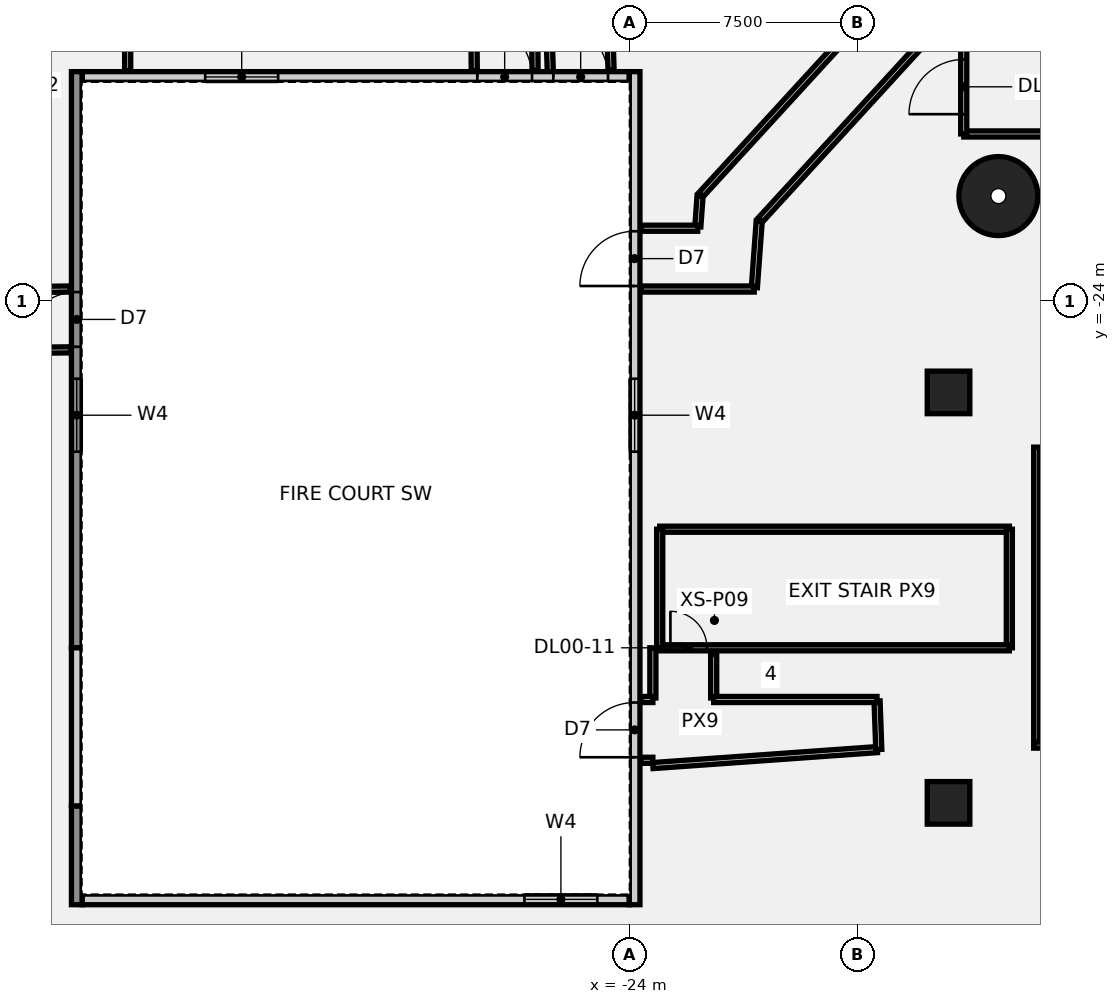
"""IFC4 building model, lengths in metres.
Left out: names, types, materials, properties, quantities, classifications, styles, units other than length and angle.
Written with IfcOpenShell. Run it as: python <this file> out.ifc"""

import sys

from ifc_helpers import new_model, si_unit, direction, frame, frame_2d, origin, origin_2d, place, context, subcontext, project, spatial, rectangle, circle, extrude, element, fill, save


model = new_model("IFC4")
c1 = context("Model", 3, precision=1e-05, world=origin(), true_north=direction((0.0, 1.0)))
c2 = subcontext(c1, "Body", "Model", "MODEL_VIEW")
j1 = project(units=[si_unit("LENGTHUNIT", "METRE"), si_unit("PLANEANGLEUNIT", "RADIAN")], contexts=[c1])
p1 = place(None, origin())
s1 = spatial("IfcSite", under=j1, at=p1, CompositionType="ELEMENT")
p2 = place(p1, origin())
s2 = spatial("IfcBuilding", under=s1, at=p2, CompositionType="ELEMENT")
p3 = place(p2, origin())
s3 = spatial("IfcBuildingStorey", under=s2, at=p3, CompositionType="ELEMENT", Elevation=0.0)
p4 = place(p3, frame((-11.86, -20.543, -0.55), z_axis=(0.0, 0.0, 1.0), x_axis=(1.0, 0.0, 0.0)))
e1 = element("IfcColumn", 1, at=p4, inside=s3, PredefinedType="COLUMN", context=c2, shape_type="SweptSolid", body=[
    extrude(circle(Radius=1.3, at=origin_2d()), origin(), (0.0, 0.0, 1.0), 9.05),
])
for number, where, z_axis, x_axis in (
    (2, (-13.5, -40.5, -0.55), (0.0, 0.0, 1.0), (1.0, 0.0, 0.0)),
    (3, (-13.5, -27.0, -0.55), (0.0, 0.0, 1.0), (1.0, 0.0, 0.0)),
):
    element("IfcColumn", number, at=place(p3, frame(where, z_axis=z_axis, x_axis=x_axis)), inside=s3, PredefinedType="COLUMN", context=c2, shape_type="SweptSolid", body=[
        extrude(rectangle(XDim=1.4, YDim=1.4, at=origin_2d()), origin(), (0.0, 0.0, 1.0), 9.05),
    ])
p5 = place(p3, frame((-23.0, -31.5, 0.0), z_axis=(0.0, 0.0, 1.0), x_axis=(1.0, 0.0, 0.0)))
e4 = element("IfcWall", 4, at=p5, inside=s3, PredefinedType="PARTITIONING", context=c2, shape_type="SweptSolid", body=[
    extrude(rectangle(XDim=11.5, YDim=0.2, at=frame_2d((5.75, 0.0))), origin(), (0.0, 0.0, 1.0), 8.5),
])
p6 = place(p3, frame((-11.5, -35.4, 0.0), z_axis=(0.0, 0.0, 1.0), x_axis=(0.0, 1.0, 0.0)))
e5 = element("IfcWall", 5, at=p6, inside=s3, PredefinedType="PARTITIONING", context=c2, shape_type="SweptSolid", body=[
    extrude(rectangle(XDim=3.9, YDim=0.2, at=frame_2d((1.95, 0.0))), origin(), (0.0, 0.0, 1.0), 8.5),
])
p7 = place(p3, frame((-23.0, -35.4, 0.0), z_axis=(0.0, 0.0, 1.0), x_axis=(1.0, 0.0, 0.0)))
e6 = element("IfcWall", 6, at=p7, inside=s3, PredefinedType="PARTITIONING", context=c2, shape_type="SweptSolid", body=[
    extrude(rectangle(XDim=11.5, YDim=0.2, at=frame_2d((5.75, 0.0))), origin(), (0.0, 0.0, 1.0), 8.5),
])
p8 = place(p7, frame((0.352, 0.0, 0.0)))
e7 = element("IfcOpeningElement", 7, at=p8, cuts=e6, PredefinedType="OPENING", context=c2, shape_type="SweptSolid", body=[
    extrude(rectangle(XDim=1.2, YDim=2.1, at=frame_2d((0.6, 1.05))), frame((0.0, 0.11, 0.0), z_axis=(0.0, -1.0, 0.0), x_axis=(1.0, 0.0, 0.0)), (0.0, 0.0, 1.0), 0.22),
])
p9 = place(p3, frame((-23.0, -35.4, 0.0), z_axis=(0.0, 0.0, 1.0), x_axis=(0.0, 1.0, 0.0)))
e8 = element("IfcWall", 8, at=p9, inside=s3, PredefinedType="PARTITIONING", context=c2, shape_type="SweptSolid", body=[
    extrude(rectangle(XDim=3.9, YDim=0.2, at=frame_2d((1.95, 0.0))), origin(), (0.0, 0.0, 1.0), 8.5),
])
p10 = place(p3, frame((-40.5, -16.42, 0.0), z_axis=(0.0, 0.0, 1.0), x_axis=(0.0, 1.0, 0.0)))
e9 = element("IfcWall", 9, at=p10, inside=s3, PredefinedType="PARTITIONING", context=c2, shape_type="SweptSolid", body=[
    extrude(rectangle(XDim=2.92, YDim=0.2, at=frame_2d((1.46, 0.0))), origin(), (0.0, 0.0, 1.0), 8.5),
])
p11 = place(p3, frame((-13.0, -18.5, 0.0), z_axis=(0.0, 0.0, 1.0), x_axis=(1.0, 0.0, 0.0)))
e10 = element("IfcWall", 10, at=p11, inside=s3, PredefinedType="PARTITIONING", context=c2, shape_type="SweptSolid", body=[
    extrude(rectangle(XDim=5.5, YDim=0.2, at=frame_2d((2.75, 0.0))), origin(), (0.0, 0.0, 1.0), 8.5),
])
p12 = place(p3, frame((-13.0, -18.5, 0.0), z_axis=(0.0, 0.0, 1.0), x_axis=(0.0, 1.0, 0.0)))
e11 = element("IfcWall", 11, at=p12, inside=s3, PredefinedType="PARTITIONING", context=c2, shape_type="SweptSolid", body=[
    extrude(rectangle(XDim=4.292, YDim=0.2, at=frame_2d((2.146, 0.0))), origin(), (0.0, 0.0, 1.0), 8.5),
])
p13 = place(p12, frame((0.651, 0.0, 0.0)))
e12 = element("IfcOpeningElement", 12, at=p13, cuts=e11, PredefinedType="OPENING", context=c2, shape_type="SweptSolid", body=[
    extrude(rectangle(XDim=1.8, YDim=2.1, at=frame_2d((0.9, 1.05))), frame((0.0, 0.11, 0.0), z_axis=(0.0, -1.0, 0.0), x_axis=(1.0, 0.0, 0.0)), (0.0, 0.0, 1.0), 0.22),
])
p14 = place(p3, frame((-27.203, -4.085, 0.0), z_axis=(0.0, 0.0, 1.0), x_axis=(0.008338160089, -0.999965236939, 0.0)))
e13 = element("IfcWall", 13, at=p14, inside=s3, PredefinedType="PARTITIONING", context=c2, shape_type="SweptSolid", body=[
    extrude(rectangle(XDim=12.327, YDim=0.2, at=frame_2d((6.164, 0.0))), origin(), (0.0, 0.0, 1.0), 8.5),
])
p15 = place(p3, frame((-29.197, -4.815, 0.0), z_axis=(0.0, 0.0, 1.0), x_axis=(0.008345305348, -0.999965177333, 0.0)))
e14 = element("IfcWall", 14, at=p15, inside=s3, PredefinedType="PARTITIONING", context=c2, shape_type="SweptSolid", body=[
    extrude(rectangle(XDim=11.614, YDim=0.2, at=frame_2d((5.807, 0.0))), origin(), (0.0, 0.0, 1.0), 8.5),
])
p16 = place(p3, frame((-12.01, -12.95, 0.0), z_axis=(0.0, 0.0, 1.0), x_axis=(-0.675727545108, -0.737151466648, 0.0)))
e15 = element("IfcWall", 15, at=p16, inside=s3, PredefinedType="PARTITIONING", context=c2, shape_type="SweptSolid", body=[
    extrude(rectangle(XDim=11.372, YDim=0.2, at=frame_2d((5.686, 0.0))), origin(), (0.0, 0.0, 1.0), 8.5),
])
p17 = place(p3, frame((-19.728, -21.369, 0.0), z_axis=(0.0, 0.0, 1.0), x_axis=(-0.072580125399, -0.997362584719, 0.0)))
e16 = element("IfcWall", 16, at=p17, inside=s3, PredefinedType="PARTITIONING", context=c2, shape_type="SweptSolid", body=[
    extrude(rectangle(XDim=2.187, YDim=0.2, at=frame_2d((1.093, 0.0))), origin(), (0.0, 0.0, 1.0), 8.5),
])
p18 = place(p3, frame((-19.89, -23.6, 0.0), z_axis=(0.0, 0.0, 1.0), x_axis=(-1.0, 0.0, 0.0)))
e17 = element("IfcWall", 17, at=p18, inside=s3, PredefinedType="PARTITIONING", context=c2, shape_type="SweptSolid", body=[
    extrude(rectangle(XDim=3.73, YDim=0.2, at=frame_2d((1.865, 0.0))), origin(), (0.0, 0.0, 1.0), 8.5),
])
p19 = place(p3, frame((-12.89, -10.95, 0.0), z_axis=(0.0, 0.0, 1.0), x_axis=(-0.675720358886, -0.737158054007, 0.0)))
e18 = element("IfcWall", 18, at=p19, inside=s3, PredefinedType="PARTITIONING", context=c2, shape_type="SweptSolid", body=[
    extrude(rectangle(XDim=12.947, YDim=0.2, at=frame_2d((6.473, 0.0))), origin(), (0.0, 0.0, 1.0), 8.5),
])
p20 = place(p3, frame((-21.672, -20.531, 0.0), z_axis=(0.0, 0.0, 1.0), x_axis=(-0.072604808335, -0.997360788184, 0.0)))
e19 = element("IfcWall", 19, at=p20, inside=s3, PredefinedType="PARTITIONING", context=c2, shape_type="SweptSolid", body=[
    extrude(rectangle(XDim=1.022, YDim=0.2, at=frame_2d((0.511, 0.0))), origin(), (0.0, 0.0, 1.0), 8.5),
])
p21 = place(p3, frame((-21.75, -21.6, 0.0), z_axis=(0.0, 0.0, 1.0), x_axis=(-1.0, 0.0, 0.0)))
e20 = element("IfcWall", 20, at=p21, inside=s3, PredefinedType="PARTITIONING", context=c2, shape_type="SweptSolid", body=[
    extrude(rectangle(XDim=1.87, YDim=0.2, at=frame_2d((0.935, 0.0))), origin(), (0.0, 0.0, 1.0), 8.5),
])
p22 = place(p3, frame((-51.762, -23.701, 0.0), z_axis=(0.0, 0.0, 1.0), x_axis=(0.999942399474, 0.010733020753, 0.0)))
e21 = element("IfcWall", 21, at=p22, inside=s3, PredefinedType="PARTITIONING", context=c2, shape_type="SweptSolid", body=[
    extrude(rectangle(XDim=9.372, YDim=0.2, at=frame_2d((4.686, 0.0))), origin(), (0.0, 0.0, 1.0), 8.5),
])
p23 = place(p3, frame((-51.638, -25.699, 0.0), z_axis=(0.0, 0.0, 1.0), x_axis=(0.999942261828, 0.010745836876, 0.0)))
e22 = element("IfcWall", 22, at=p23, inside=s3, PredefinedType="PARTITIONING", context=c2, shape_type="SweptSolid", body=[
    extrude(rectangle(XDim=9.27, YDim=0.2, at=frame_2d((4.635, 0.0))), origin(), (0.0, 0.0, 1.0), 8.5),
])
p24 = place(p3, frame((-21.225, -35.62, 0.0), z_axis=(0.0, 0.0, 1.0), x_axis=(0.0, -1.0, 0.0)))
e23 = element("IfcWall", 23, at=p24, inside=s3, PredefinedType="PARTITIONING", context=c2, shape_type="SweptSolid", body=[
    extrude(rectangle(XDim=1.43, YDim=0.2, at=frame_2d((0.715, 0.0))), origin(), (0.0, 0.0, 1.0), 8.5),
])
p25 = place(p3, frame((-23.225, -39.1, 0.0), z_axis=(0.0, 0.0, 1.0), x_axis=(-1.0, 0.0, 0.0)))
e24 = element("IfcWall", 24, at=p25, inside=s3, PredefinedType="PARTITIONING", context=c2, shape_type="SweptSolid", body=[
    extrude(rectangle(XDim=0.395, YDim=0.2, at=frame_2d((0.198, 0.0))), origin(), (0.0, 0.0, 1.0), 8.5),
])
p26 = place(p3, frame((-23.225, -35.4, 0.0), z_axis=(0.0, 0.0, 1.0), x_axis=(0.0, -1.0, 0.0)))
e25 = element("IfcWall", 25, at=p26, inside=s3, PredefinedType="PARTITIONING", context=c2, shape_type="SweptSolid", body=[
    extrude(rectangle(XDim=1.65, YDim=0.2, at=frame_2d((0.825, 0.0))), origin(), (0.0, 0.0, 1.0), 8.5),
])
p27 = place(p3, frame((-23.225, -37.1, 0.0), z_axis=(0.0, 0.0, 1.0), x_axis=(-1.0, 0.0, 0.0)))
e26 = element("IfcWall", 26, at=p27, inside=s3, PredefinedType="PARTITIONING", context=c2, shape_type="SweptSolid", body=[
    extrude(rectangle(XDim=0.395, YDim=0.2, at=frame_2d((0.198, 0.0))), origin(), (0.0, 0.0, 1.0), 8.5),
])
p28 = place(p3, frame((-23.225, -39.274, 0.0), z_axis=(0.0, 0.0, 1.0), x_axis=(0.997476420844, 0.070998520131, 0.0)))
e27 = element("IfcWall", 27, at=p28, inside=s3, PredefinedType="PARTITIONING", context=c2, shape_type="SweptSolid", body=[
    extrude(rectangle(XDim=7.4, YDim=0.2, at=frame_2d((3.7, 0.0))), origin(), (0.0, 0.0, 1.0), 8.5),
])
p29 = place(p3, frame((-15.794, -38.745, 0.0), z_axis=(0.0, 0.0, 1.0), x_axis=(-0.035489644916, 0.99937004413, 0.0)))
e28 = element("IfcWall", 28, at=p29, inside=s3, PredefinedType="PARTITIONING", context=c2, shape_type="SweptSolid", body=[
    extrude(rectangle(XDim=1.596, YDim=0.2, at=frame_2d((0.798, 0.0))), origin(), (0.0, 0.0, 1.0), 8.5),
])
p30 = place(p3, frame((-15.852, -37.1, 0.0), z_axis=(0.0, 0.0, 1.0), x_axis=(-1.0, 0.0, 0.0)))
e29 = element("IfcWall", 29, at=p30, inside=s3, PredefinedType="PARTITIONING", context=c2, shape_type="SweptSolid", body=[
    extrude(rectangle(XDim=5.373, YDim=0.2, at=frame_2d((2.687, 0.0))), origin(), (0.0, 0.0, 1.0), 8.5),
])
p31 = place(p3, frame((-24.695, -13.355, 0.0), z_axis=(0.0, 0.0, 1.0), x_axis=(0.030966071292, -0.999520436224, 0.0)))
e30 = element("IfcWall", 30, at=p31, inside=s3, PredefinedType="PARTITIONING", context=c2, shape_type="SweptSolid", body=[
    extrude(rectangle(XDim=3.035, YDim=0.2, at=frame_2d((1.518, 0.0))), origin(), (0.0, 0.0, 1.0), 8.5),
])
p32 = place(p3, frame((-26.705, -13.045, 0.0), z_axis=(0.0, 0.0, 1.0), x_axis=(0.031031151855, -0.999518417847, 0.0)))
e31 = element("IfcWall", 31, at=p32, inside=s3, PredefinedType="PARTITIONING", context=c2, shape_type="SweptSolid", body=[
    extrude(rectangle(XDim=3.407, YDim=0.2, at=frame_2d((1.703, 0.0))), origin(), (0.0, 0.0, 1.0), 8.5),
])
p33 = place(p3, frame((-10.6, -28.8, 0.0), z_axis=(0.0, 0.0, 1.0), x_axis=(0.0, -1.0, 0.0)))
e32 = element("IfcWall", 32, at=p33, inside=s3, PredefinedType="SOLIDWALL", context=c2, shape_type="SweptSolid", body=[
    extrude(rectangle(XDim=9.7, YDim=0.2, at=frame_2d((4.85, 0.0))), origin(), (0.0, 0.0, 1.0), 8.5),
])
p34 = place(p3, frame((-10.7, -38.6, 0.0), z_axis=(0.0, 0.0, 1.0), x_axis=(1.0, 0.0, 0.0)))
e33 = element("IfcWall", 33, at=p34, inside=s3, PredefinedType="SOLIDWALL", context=c2, shape_type="SweptSolid", body=[
    extrude(rectangle(XDim=4.3, YDim=0.2, at=frame_2d((2.15, 0.0))), origin(), (0.0, 0.0, 1.0), 8.5),
])
p35 = place(p3, frame((-42.0, -43.675, 0.0), z_axis=(0.0, 0.0, 1.0), x_axis=(1.0, 0.0, 0.0)))
e34 = element("IfcWall", 34, at=p35, inside=s3, PredefinedType="SOLIDWALL", context=c2, shape_type="SweptSolid", body=[
    extrude(rectangle(XDim=18.0, YDim=0.35, at=frame_2d((9.0, 0.0))), origin(), (0.0, 0.0, 1.0), 8.5),
])
p36 = place(p35, frame((14.55, 0.0, 1.0)))
e35 = element("IfcOpeningElement", 35, at=p36, cuts=e34, PredefinedType="OPENING", context=c2, shape_type="SweptSolid", body=[
    extrude(rectangle(XDim=2.4, YDim=1.8, at=frame_2d((1.2, 0.9))), frame((0.0, 0.185, 0.0), z_axis=(0.0, -1.0, 0.0), x_axis=(1.0, 0.0, 0.0)), (0.0, 0.0, 1.0), 0.37),
])
p37 = place(p3, frame((-42.0, -16.625, 0.0), z_axis=(0.0, 0.0, 1.0), x_axis=(1.0, 0.0, 0.0)))
e36 = element("IfcWall", 36, at=p37, inside=s3, PredefinedType="SOLIDWALL", context=c2, shape_type="SweptSolid", body=[
    extrude(rectangle(XDim=18.0, YDim=0.35, at=frame_2d((9.0, 0.0))), origin(), (0.0, 0.0, 1.0), 8.5),
])
p38 = place(p37, frame((13.0, 0.0, 0.0)))
e37 = element("IfcOpeningElement", 37, at=p38, cuts=e36, PredefinedType="OPENING", context=c2, shape_type="SweptSolid", body=[
    extrude(rectangle(XDim=1.8, YDim=2.4, at=frame_2d((0.9, 1.2))), frame((0.0, 0.185, 0.0), z_axis=(0.0, -1.0, 0.0), x_axis=(1.0, 0.0, 0.0)), (0.0, 0.0, 1.0), 0.37),
])
p39 = place(p37, frame((15.5, 0.0, 0.0)))
e38 = element("IfcOpeningElement", 38, at=p39, cuts=e36, PredefinedType="OPENING", context=c2, shape_type="SweptSolid", body=[
    extrude(rectangle(XDim=1.8, YDim=2.4, at=frame_2d((0.9, 1.2))), frame((0.0, 0.185, 0.0), z_axis=(0.0, -1.0, 0.0), x_axis=(1.0, 0.0, 0.0)), (0.0, 0.0, 1.0), 0.37),
])
p40 = place(p37, frame((4.05, 0.0, 1.0)))
e39 = element("IfcOpeningElement", 39, at=p40, cuts=e36, PredefinedType="OPENING", context=c2, shape_type="SweptSolid", body=[
    extrude(rectangle(XDim=2.4, YDim=1.8, at=frame_2d((1.2, 0.9))), frame((0.0, 0.185, 0.0), z_axis=(0.0, -1.0, 0.0), x_axis=(1.0, 0.0, 0.0)), (0.0, 0.0, 1.0), 0.37),
])
p41 = place(p3, frame((-42.175, -43.85, 0.0), z_axis=(0.0, 0.0, 1.0), x_axis=(0.0, 1.0, 0.0)))
e40 = element("IfcWall", 40, at=p41, inside=s3, PredefinedType="SOLIDWALL", context=c2, shape_type="SweptSolid", body=[
    extrude(rectangle(XDim=3.25, YDim=0.35, at=frame_2d((1.625, 0.0))), origin(), (0.0, 0.0, 1.0), 8.5),
])
p42 = place(p3, frame((-42.175, -35.4, 0.0), z_axis=(0.0, 0.0, 1.0), x_axis=(0.0, 1.0, 0.0)))
e41 = element("IfcWall", 41, at=p42, inside=s3, PredefinedType="SOLIDWALL", context=c2, shape_type="SweptSolid", body=[
    extrude(rectangle(XDim=18.95, YDim=0.35, at=frame_2d((9.475, 0.0))), origin(), (0.0, 0.0, 1.0), 8.5),
])
p43 = place(p42, frame((9.9, 0.0, 0.0)))
e42 = element("IfcOpeningElement", 42, at=p43, cuts=e41, PredefinedType="OPENING", context=c2, shape_type="SweptSolid", body=[
    extrude(rectangle(XDim=1.8, YDim=2.4, at=frame_2d((0.9, 1.2))), frame((0.0, 0.185, 0.0), z_axis=(0.0, -1.0, 0.0), x_axis=(1.0, 0.0, 0.0)), (0.0, 0.0, 1.0), 0.37),
])
p44 = place(p42, frame((6.45, 0.0, 1.0)))
e43 = element("IfcOpeningElement", 43, at=p44, cuts=e41, PredefinedType="OPENING", context=c2, shape_type="SweptSolid", body=[
    extrude(rectangle(XDim=2.4, YDim=1.8, at=frame_2d((1.2, 0.9))), frame((0.0, 0.185, 0.0), z_axis=(0.0, -1.0, 0.0), x_axis=(1.0, 0.0, 0.0)), (0.0, 0.0, 1.0), 0.37),
])
p45 = place(p3, frame((-42.175, -40.6, 4.9), z_axis=(0.0, 0.0, 1.0), x_axis=(0.0, 1.0, 0.0)))
e44 = element("IfcWall", 44, at=p45, inside=s3, PredefinedType="SOLIDWALL", context=c2, shape_type="SweptSolid", body=[
    extrude(rectangle(XDim=5.2, YDim=0.35, at=frame_2d((2.6, 0.0))), origin(), (0.0, 0.0, 1.0), 3.6),
])
p46 = place(p3, frame((-23.825, -43.85, 0.0), z_axis=(0.0, 0.0, 1.0), x_axis=(0.0, 1.0, 0.0)))
e45 = element("IfcWall", 45, at=p46, inside=s3, PredefinedType="SOLIDWALL", context=c2, shape_type="SweptSolid", body=[
    extrude(rectangle(XDim=27.4, YDim=0.35, at=frame_2d((13.7, 0.0))), origin(), (0.0, 0.0, 1.0), 8.5),
])
p47 = place(p46, frame((20.35, 0.0, 0.0)))
e46 = element("IfcOpeningElement", 46, at=p47, cuts=e45, PredefinedType="OPENING", context=c2, shape_type="SweptSolid", body=[
    extrude(rectangle(XDim=1.8, YDim=2.4, at=frame_2d((0.9, 1.2))), frame((0.0, 0.185, 0.0), z_axis=(0.0, -1.0, 0.0), x_axis=(1.0, 0.0, 0.0)), (0.0, 0.0, 1.0), 0.37),
])
p48 = place(p46, frame((4.85, 0.0, 0.0)))
e47 = element("IfcOpeningElement", 47, at=p48, cuts=e45, PredefinedType="OPENING", context=c2, shape_type="SweptSolid", body=[
    extrude(rectangle(XDim=1.8, YDim=2.4, at=frame_2d((0.9, 1.2))), frame((0.0, 0.185, 0.0), z_axis=(0.0, -1.0, 0.0), x_axis=(1.0, 0.0, 0.0)), (0.0, 0.0, 1.0), 0.37),
])
p49 = place(p46, frame((14.9, 0.0, 1.0)))
e48 = element("IfcOpeningElement", 48, at=p49, cuts=e45, PredefinedType="OPENING", context=c2, shape_type="SweptSolid", body=[
    extrude(rectangle(XDim=2.4, YDim=1.8, at=frame_2d((1.2, 0.9))), frame((0.0, 0.185, 0.0), z_axis=(0.0, -1.0, 0.0), x_axis=(1.0, 0.0, 0.0)), (0.0, 0.0, 1.0), 0.37),
])
p50 = place(p8, origin())
e49 = element("IfcDoor", 49, at=p50, inside=s3, OperationType="SINGLE_SWING_LEFT", PredefinedType="DOOR", context=c2, shape_type="SweptSolid", body=[
    extrude(rectangle(XDim=1.2, YDim=2.1, at=frame_2d((0.6, 1.05))), frame((0.0, 0.025, 0.0), z_axis=(0.0, -1.0, 0.0), x_axis=(1.0, 0.0, 0.0)), (0.0, 0.0, 1.0), 0.05),
])
fill(e7, e49)
p51 = place(p13, origin())
e50 = element("IfcDoor", 50, at=p51, inside=s3, OperationType="SINGLE_SWING_LEFT", PredefinedType="DOOR", context=c2, shape_type="SweptSolid", body=[
    extrude(rectangle(XDim=1.8, YDim=2.1, at=frame_2d((0.9, 1.05))), frame((0.0, 0.025, 0.0), z_axis=(0.0, -1.0, 0.0), x_axis=(1.0, 0.0, 0.0)), (0.0, 0.0, 1.0), 0.05),
])
fill(e12, e50)
p52 = place(p36, origin())
e51 = element("IfcWindow", 51, at=p52, inside=s3, PartitioningType="SINGLE_PANEL", PredefinedType="WINDOW", context=c2, shape_type="SweptSolid", body=[
    extrude(rectangle(XDim=2.4, YDim=1.8, at=frame_2d((1.2, 0.9))), frame((0.0, 0.03, 0.0), z_axis=(0.0, -1.0, 0.0), x_axis=(1.0, 0.0, 0.0)), (0.0, 0.0, 1.0), 0.06),
])
fill(e35, e51)
p53 = place(p38, frame((1.8, 0.0, 0.0), z_axis=(0.0, 0.0, 1.0), x_axis=(-1.0, 0.0, 0.0)))
e52 = element("IfcDoor", 52, at=p53, inside=s3, OperationType="SINGLE_SWING_LEFT", PredefinedType="DOOR", context=c2, shape_type="SweptSolid", body=[
    extrude(rectangle(XDim=1.8, YDim=2.4, at=frame_2d((0.9, 1.2))), frame((0.0, 0.025, 0.0), z_axis=(0.0, -1.0, 0.0), x_axis=(1.0, 0.0, 0.0)), (0.0, 0.0, 1.0), 0.05),
])
fill(e37, e52)
p54 = place(p39, frame((1.8, 0.0, 0.0), z_axis=(0.0, 0.0, 1.0), x_axis=(-1.0, 0.0, 0.0)))
e53 = element("IfcDoor", 53, at=p54, inside=s3, OperationType="SINGLE_SWING_LEFT", PredefinedType="DOOR", context=c2, shape_type="SweptSolid", body=[
    extrude(rectangle(XDim=1.8, YDim=2.4, at=frame_2d((0.9, 1.2))), frame((0.0, 0.025, 0.0), z_axis=(0.0, -1.0, 0.0), x_axis=(1.0, 0.0, 0.0)), (0.0, 0.0, 1.0), 0.05),
])
fill(e38, e53)
p55 = place(p40, origin())
e54 = element("IfcWindow", 54, at=p55, inside=s3, PartitioningType="SINGLE_PANEL", PredefinedType="WINDOW", context=c2, shape_type="SweptSolid", body=[
    extrude(rectangle(XDim=2.4, YDim=1.8, at=frame_2d((1.2, 0.9))), frame((0.0, 0.03, 0.0), z_axis=(0.0, -1.0, 0.0), x_axis=(1.0, 0.0, 0.0)), (0.0, 0.0, 1.0), 0.06),
])
fill(e39, e54)
p56 = place(p43, frame((1.8, 0.0, 0.0), z_axis=(0.0, 0.0, 1.0), x_axis=(-1.0, 0.0, 0.0)))
e55 = element("IfcDoor", 55, at=p56, inside=s3, OperationType="SINGLE_SWING_LEFT", PredefinedType="DOOR", context=c2, shape_type="SweptSolid", body=[
    extrude(rectangle(XDim=1.8, YDim=2.4, at=frame_2d((0.9, 1.2))), frame((0.0, 0.025, 0.0), z_axis=(0.0, -1.0, 0.0), x_axis=(1.0, 0.0, 0.0)), (0.0, 0.0, 1.0), 0.05),
])
fill(e42, e55)
p57 = place(p44, origin())
e56 = element("IfcWindow", 56, at=p57, inside=s3, PartitioningType="SINGLE_PANEL", PredefinedType="WINDOW", context=c2, shape_type="SweptSolid", body=[
    extrude(rectangle(XDim=2.4, YDim=1.8, at=frame_2d((1.2, 0.9))), frame((0.0, 0.03, 0.0), z_axis=(0.0, -1.0, 0.0), x_axis=(1.0, 0.0, 0.0)), (0.0, 0.0, 1.0), 0.06),
])
fill(e43, e56)
p58 = place(p47, origin())
e57 = element("IfcDoor", 57, at=p58, inside=s3, OperationType="SINGLE_SWING_LEFT", PredefinedType="DOOR", context=c2, shape_type="SweptSolid", body=[
    extrude(rectangle(XDim=1.8, YDim=2.4, at=frame_2d((0.9, 1.2))), frame((0.0, 0.025, 0.0), z_axis=(0.0, -1.0, 0.0), x_axis=(1.0, 0.0, 0.0)), (0.0, 0.0, 1.0), 0.05),
])
fill(e46, e57)
p59 = place(p48, origin())
e58 = element("IfcDoor", 58, at=p59, inside=s3, OperationType="SINGLE_SWING_LEFT", PredefinedType="DOOR", context=c2, shape_type="SweptSolid", body=[
    extrude(rectangle(XDim=1.8, YDim=2.4, at=frame_2d((0.9, 1.2))), frame((0.0, 0.025, 0.0), z_axis=(0.0, -1.0, 0.0), x_axis=(1.0, 0.0, 0.0)), (0.0, 0.0, 1.0), 0.05),
])
fill(e47, e58)
p60 = place(p49, origin())
e59 = element("IfcWindow", 59, at=p60, inside=s3, PartitioningType="SINGLE_PANEL", PredefinedType="WINDOW", context=c2, shape_type="SweptSolid", body=[
    extrude(rectangle(XDim=2.4, YDim=1.8, at=frame_2d((1.2, 0.9))), frame((0.0, 0.03, 0.0), z_axis=(0.0, -1.0, 0.0), x_axis=(1.0, 0.0, 0.0)), (0.0, 0.0, 1.0), 0.06),
])
fill(e48, e59)
save(model, sys.argv[1])
